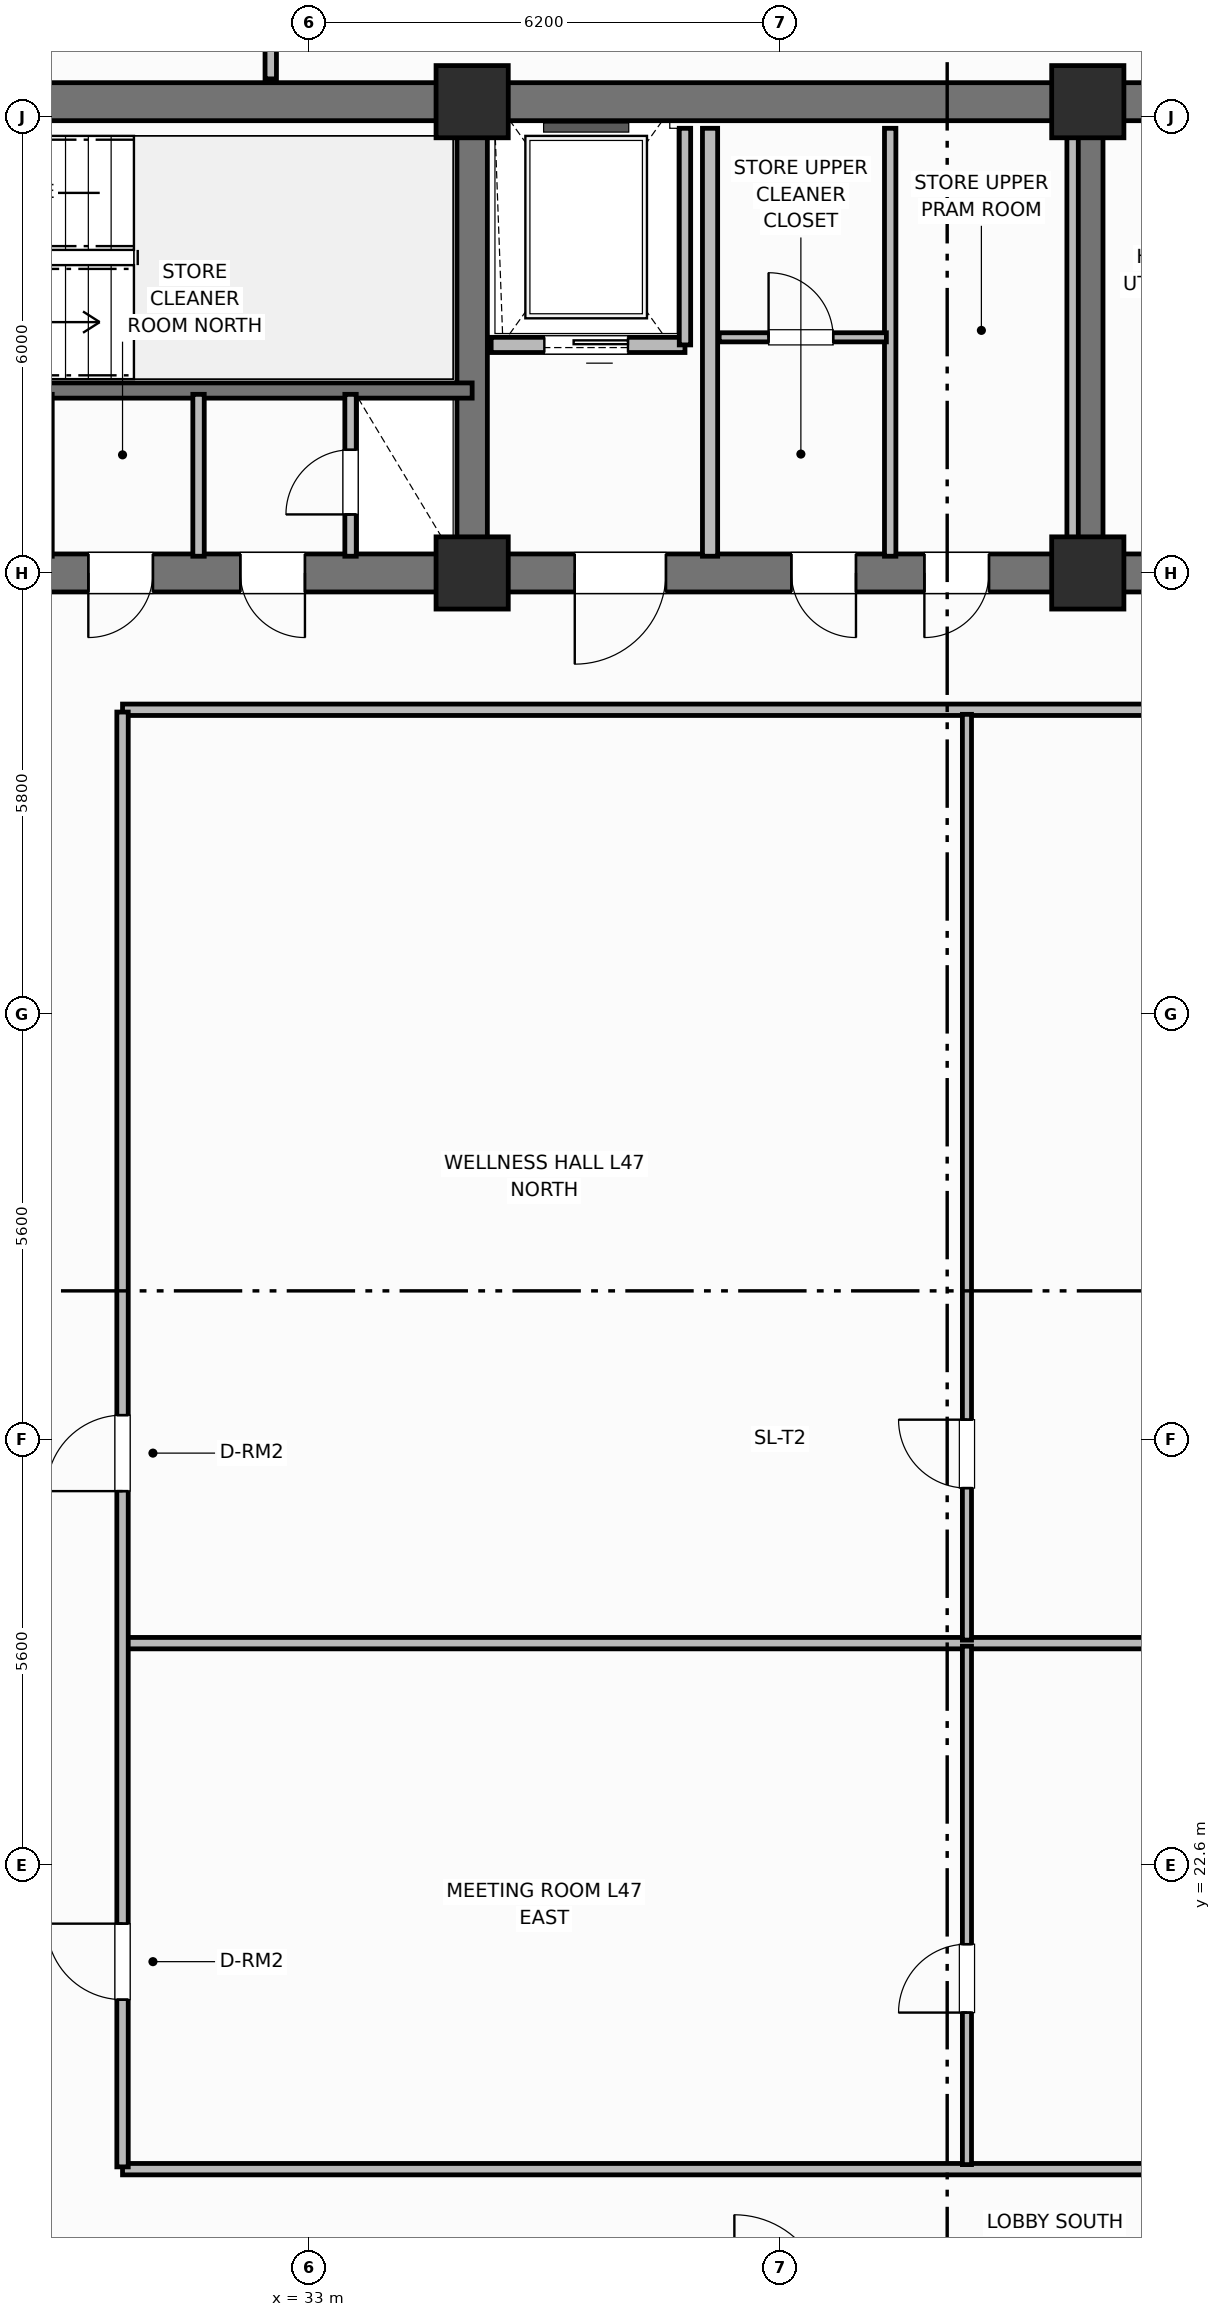
"""IFC4 building model, lengths in metres.
Left out: names, types, materials, properties, quantities, classifications, styles, units other than length and angle.
Written with IfcOpenShell. Run it as: python <this file> out.ifc"""

import sys

from ifc_helpers import new_model, si_unit, direction, frame, frame_2d, origin, origin_2d, place, context, subcontext, project, spatial, rectangle, extrude, element, fill, save


model = new_model("IFC4")
c1 = context("Model", 3, precision=1e-05, world=origin(), true_north=direction((0.0, 1.0)))
c2 = subcontext(c1, "Body", "Model", "MODEL_VIEW")
j1 = project(units=[si_unit("LENGTHUNIT", "METRE"), si_unit("PLANEANGLEUNIT", "RADIAN")], contexts=[c1])
p1 = place(None, origin())
s1 = spatial("IfcSite", under=j1, at=p1, CompositionType="ELEMENT")
p2 = place(p1, origin())
s2 = spatial("IfcBuilding", under=s1, at=p2, CompositionType="ELEMENT")
p3 = place(p2, frame((0.0, 0.0, 188.5)))
s3 = spatial("IfcBuildingStorey", under=s2, at=p3, CompositionType="ELEMENT", Elevation=188.5)
p4 = place(p3, frame((25.6, 45.8, 0.0), z_axis=(0.0, 0.0, 1.0), x_axis=(1.0, 0.0, 0.0)))
e1 = element("IfcWall", 1, at=p4, inside=s3, PredefinedType="SHEAR", context=c2, shape_type="SweptSolid", body=[
    extrude(rectangle(XDim=27.2, YDim=0.5, at=frame_2d((13.6, 0.0))), origin(), (0.0, 0.0, 1.0), 3.7),
])
p5 = place(p3, frame((52.8, 39.6, 0.0), z_axis=(0.0, 0.0, 1.0), x_axis=(-1.0, 0.0, 0.0)))
e2 = element("IfcWall", 2, at=p5, inside=s3, PredefinedType="SHEAR", context=c2, shape_type="SweptSolid", body=[
    extrude(rectangle(XDim=27.2, YDim=0.5, at=frame_2d((13.6, 0.0))), origin(), (0.0, 0.0, 1.0), 3.7),
])
p6 = place(p5, frame((24.3, 0.0, 0.0)))
e3 = element("IfcOpeningElement", 3, at=p6, cuts=e2, PredefinedType="OPENING", context=c2, shape_type="SweptSolid", body=[
    extrude(rectangle(XDim=1.1, YDim=2.15, at=frame_2d((0.55, 1.075))), frame((0.0, 0.26, 0.0), z_axis=(0.0, -1.0, 0.0), x_axis=(1.0, 0.0, 0.0)), (0.0, 0.0, 1.0), 0.52),
])
p7 = place(p5, frame((21.85, 0.0, 0.0)))
e4 = element("IfcOpeningElement", 4, at=p7, cuts=e2, PredefinedType="OPENING", context=c2, shape_type="SweptSolid", body=[
    extrude(rectangle(XDim=0.85, YDim=2.1, at=frame_2d((0.425, 1.05))), frame((0.0, 0.26, 0.0), z_axis=(0.0, -1.0, 0.0), x_axis=(1.0, 0.0, 0.0)), (0.0, 0.0, 1.0), 0.52),
])
p8 = place(p5, frame((19.85, 0.0, 0.0)))
e5 = element("IfcOpeningElement", 5, at=p8, cuts=e2, PredefinedType="OPENING", context=c2, shape_type="SweptSolid", body=[
    extrude(rectangle(XDim=0.85, YDim=2.1, at=frame_2d((0.425, 1.05))), frame((0.0, 0.26, 0.0), z_axis=(0.0, -1.0, 0.0), x_axis=(1.0, 0.0, 0.0)), (0.0, 0.0, 1.0), 0.52),
])
p9 = place(p5, frame((15.1, 0.0, 0.0)))
e6 = element("IfcOpeningElement", 6, at=p9, cuts=e2, PredefinedType="OPENING", context=c2, shape_type="SweptSolid", body=[
    extrude(rectangle(XDim=1.2, YDim=2.15, at=frame_2d((0.6, 1.075))), frame((0.0, 0.26, 0.0), z_axis=(0.0, -1.0, 0.0), x_axis=(1.0, 0.0, 0.0)), (0.0, 0.0, 1.0), 0.52),
])
p10 = place(p5, frame((12.6, 0.0, 0.0)))
e7 = element("IfcOpeningElement", 7, at=p10, cuts=e2, PredefinedType="OPENING", context=c2, shape_type="SweptSolid", body=[
    extrude(rectangle(XDim=0.85, YDim=2.1, at=frame_2d((0.425, 1.05))), frame((0.0, 0.26, 0.0), z_axis=(0.0, -1.0, 0.0), x_axis=(1.0, 0.0, 0.0)), (0.0, 0.0, 1.0), 0.52),
])
p11 = place(p5, frame((10.85, 0.0, 0.0)))
e8 = element("IfcOpeningElement", 8, at=p11, cuts=e2, PredefinedType="OPENING", context=c2, shape_type="SweptSolid", body=[
    extrude(rectangle(XDim=0.85, YDim=2.1, at=frame_2d((0.425, 1.05))), frame((0.0, 0.26, 0.0), z_axis=(0.0, -1.0, 0.0), x_axis=(1.0, 0.0, 0.0)), (0.0, 0.0, 1.0), 0.52),
])
p12 = place(p5, frame((7.35, 0.0, 0.0)))
e9 = element("IfcOpeningElement", 9, at=p12, cuts=e2, PredefinedType="OPENING", context=c2, shape_type="SweptSolid", body=[
    extrude(rectangle(XDim=0.85, YDim=2.1, at=frame_2d((0.425, 1.05))), frame((0.0, 0.26, 0.0), z_axis=(0.0, -1.0, 0.0), x_axis=(1.0, 0.0, 0.0)), (0.0, 0.0, 1.0), 0.52),
])
p13 = place(p5, frame((5.35, 0.0, 0.0)))
e10 = element("IfcOpeningElement", 10, at=p13, cuts=e2, PredefinedType="OPENING", context=c2, shape_type="SweptSolid", body=[
    extrude(rectangle(XDim=0.85, YDim=2.1, at=frame_2d((0.425, 1.05))), frame((0.0, 0.26, 0.0), z_axis=(0.0, -1.0, 0.0), x_axis=(1.0, 0.0, 0.0)), (0.0, 0.0, 1.0), 0.52),
])
p14 = place(p5, frame((2.0, 0.0, 0.0)))
e11 = element("IfcOpeningElement", 11, at=p14, cuts=e2, PredefinedType="OPENING", context=c2, shape_type="SweptSolid", body=[
    extrude(rectangle(XDim=0.85, YDim=2.1, at=frame_2d((0.425, 1.05))), frame((0.0, 0.26, 0.0), z_axis=(0.0, -1.0, 0.0), x_axis=(1.0, 0.0, 0.0)), (0.0, 0.0, 1.0), 0.52),
])
for number, where, z_axis, x_axis in (
    (12, (35.15, 39.85, 0.0), (0.0, 0.0, 1.0), (0.0, 1.0, 0.0)),
    (13, (43.25, 39.85, 0.0), (0.0, 0.0, 1.0), (0.0, 1.0, 0.0)),
):
    element("IfcWall", number, at=place(p3, frame(where, z_axis=z_axis, x_axis=x_axis)), inside=s3, PredefinedType="SHEAR", context=c2, shape_type="SweptSolid", body=[
        extrude(rectangle(XDim=5.7, YDim=0.4, at=frame_2d((2.85, 0.0))), origin(), (0.0, 0.0, 1.0), 3.7),
    ])
for number, where, z_axis, x_axis in (
    (14, (35.15, 39.6, 0.0), (0.0, 0.0, 1.0), (1.0, 0.0, 0.0)),
    (15, (35.15, 45.8, 0.0), (0.0, 0.0, 1.0), (1.0, 0.0, 0.0)),
    (16, (43.25, 39.6, 0.0), (0.0, 0.0, 1.0), (1.0, 0.0, 0.0)),
    (17, (43.25, 45.8, 0.0), (0.0, 0.0, 1.0), (1.0, 0.0, 0.0)),
):
    element("IfcColumn", number, at=place(p3, frame(where, z_axis=z_axis, x_axis=x_axis)), inside=s3, PredefinedType="COLUMN", context=c2, shape_type="SweptSolid", body=[
        extrude(rectangle(XDim=0.95, YDim=0.95, at=origin_2d()), origin(), (0.0, 0.0, 1.0), 3.7),
    ])
p15 = place(p3, frame((35.15, 42.0, 0.0), z_axis=(0.0, 0.0, 1.0), x_axis=(-1.0, 0.0, 0.0)))
e18 = element("IfcWall", 18, at=p15, inside=s3, PredefinedType="SHEAR", context=c2, shape_type="SweptSolid", body=[
    extrude(rectangle(XDim=9.55, YDim=0.2, at=frame_2d((4.775, 0.0))), origin(), (0.0, 0.0, 1.0), 3.7),
])
p16 = place(p15, frame((7.25, 0.0, 0.0)))
e19 = element("IfcOpeningElement", 19, at=p16, cuts=e18, PredefinedType="OPENING", context=c2, shape_type="SweptSolid", body=[
    extrude(rectangle(XDim=1.1, YDim=2.15, at=frame_2d((0.55, 1.075))), frame((0.0, 0.11, 0.0), z_axis=(0.0, -1.0, 0.0), x_axis=(1.0, 0.0, 0.0)), (0.0, 0.0, 1.0), 0.22),
])
p17 = place(p3, frame((33.55, 39.82, 0.0), z_axis=(0.0, 0.0, 1.0), x_axis=(0.0, 1.0, 0.0)))
e20 = element("IfcWall", 20, at=p17, inside=s3, PredefinedType="PARTITIONING", context=c2, shape_type="SweptSolid", body=[
    extrude(rectangle(XDim=2.13, YDim=0.15, at=frame_2d((1.065, 0.0))), origin(), (0.0, 0.0, 1.0), 2.55),
])
p18 = place(p17, frame((0.55, 0.0, 0.0)))
e21 = element("IfcOpeningElement", 21, at=p18, cuts=e20, PredefinedType="OPENING", context=c2, shape_type="SweptSolid", body=[
    extrude(rectangle(XDim=0.85, YDim=2.05, at=frame_2d((0.425, 1.025))), frame((0.0, 0.085, 0.0), z_axis=(0.0, -1.0, 0.0), x_axis=(1.0, 0.0, 0.0)), (0.0, 0.0, 1.0), 0.17),
])
for number, where, z_axis, x_axis in (
    (22, (29.55, 39.82, 0.0), (0.0, 0.0, 1.0), (0.0, 1.0, 0.0)),
    (23, (31.55, 39.82, 0.0), (0.0, 0.0, 1.0), (0.0, 1.0, 0.0)),
):
    element("IfcWall", number, at=place(p3, frame(where, z_axis=z_axis, x_axis=x_axis)), inside=s3, PredefinedType="PARTITIONING", context=c2, shape_type="SweptSolid", body=[
        extrude(rectangle(XDim=2.13, YDim=0.15, at=frame_2d((1.065, 0.0))), origin(), (0.0, 0.0, 1.0), 2.55),
    ])
p19 = place(p3, frame((37.95, 42.6, 0.0), z_axis=(0.0, 0.0, 1.0), x_axis=(-1.0, 0.0, 0.0)))
e24 = element("IfcWall", 24, at=p19, inside=s3, PredefinedType="PARTITIONING", context=c2, shape_type="SweptSolid", body=[
    extrude(rectangle(XDim=2.55, YDim=0.2, at=frame_2d((1.275, 0.0))), origin(), (0.0, 0.0, 1.0), 2.32),
])
p20 = place(p19, frame((0.75, 0.0, 0.0)))
e25 = element("IfcOpeningElement", 25, at=p20, cuts=e24, PredefinedType="OPENING", context=c2, shape_type="SweptSolid", body=[
    extrude(rectangle(XDim=1.1, YDim=2.15, at=frame_2d((0.55, 1.075))), frame((0.0, 0.11, 0.0), z_axis=(0.0, -1.0, 0.0), x_axis=(1.0, 0.0, 0.0)), (0.0, 0.0, 1.0), 0.22),
])
p21 = place(p3, frame((37.95, 42.6, 0.0), z_axis=(0.0, 0.0, 1.0), x_axis=(0.0, 1.0, 0.0)))
e26 = element("IfcWall", 26, at=p21, inside=s3, PredefinedType="PARTITIONING", context=c2, shape_type="SweptSolid", body=[
    extrude(rectangle(XDim=2.85, YDim=0.15, at=frame_2d((1.425, 0.0))), origin(), (0.0, 0.0, 1.0), 2.55),
])
p22 = place(p3, frame((38.28, 39.82, 0.0), z_axis=(0.0, 0.0, 1.0), x_axis=(0.0, 1.0, 0.0)))
e27 = element("IfcWall", 27, at=p22, inside=s3, PredefinedType="PARTITIONING", context=c2, shape_type="SweptSolid", body=[
    extrude(rectangle(XDim=5.63, YDim=0.2, at=frame_2d((2.815, 0.0))), origin(), (0.0, 0.0, 1.0), 2.55),
])
for number, where, z_axis, x_axis in (
    (28, (43.05, 39.82, 0.0), (0.0, 0.0, 1.0), (0.0, 1.0, 0.0)),
    (29, (40.65, 39.82, 0.0), (0.0, 0.0, 1.0), (0.0, 1.0, 0.0)),
):
    element("IfcWall", number, at=place(p3, frame(where, z_axis=z_axis, x_axis=x_axis)), inside=s3, PredefinedType="PARTITIONING", context=c2, shape_type="SweptSolid", body=[
        extrude(rectangle(XDim=5.63, YDim=0.15, at=frame_2d((2.815, 0.0))), origin(), (0.0, 0.0, 1.0), 2.55),
    ])
p23 = place(p3, frame((38.4, 42.7, 0.0), z_axis=(0.0, 0.0, 1.0), x_axis=(1.0, 0.0, 0.0)))
e30 = element("IfcWall", 30, at=p23, inside=s3, PredefinedType="PARTITIONING", context=c2, shape_type="SweptSolid", body=[
    extrude(rectangle(XDim=2.2, YDim=0.12, at=frame_2d((1.1, 0.0))), origin(), (0.0, 0.0, 1.0), 2.32),
])
p24 = place(p23, frame((0.65, 0.0, 0.0)))
e31 = element("IfcOpeningElement", 31, at=p24, cuts=e30, PredefinedType="OPENING", context=c2, shape_type="SweptSolid", body=[
    extrude(rectangle(XDim=0.85, YDim=2.1, at=frame_2d((0.425, 1.05))), frame((0.0, 0.07, 0.0), z_axis=(0.0, -1.0, 0.0), x_axis=(1.0, 0.0, 0.0)), (0.0, 0.0, 1.0), 0.14),
])
for number, where, z_axis, x_axis in (
    (32, (30.55, 18.6, 0.0), (0.0, 0.0, 1.0), (1.0, 0.0, 0.0)),
    (33, (30.55, 37.8, 0.0), (0.0, 0.0, 1.0), (1.0, 0.0, 0.0)),
):
    element("IfcWall", number, at=place(p3, frame(where, z_axis=z_axis, x_axis=x_axis)), inside=s3, PredefinedType="PARTITIONING", context=c2, shape_type="SweptSolid", body=[
        extrude(rectangle(XDim=22.3, YDim=0.15, at=frame_2d((11.15, 0.0))), origin(), (0.0, 0.0, 1.0), 2.55),
    ])
p25 = place(p3, frame((30.58, 25.521, 0.0), z_axis=(0.0, 0.0, 1.0), x_axis=(1.0, 0.0, 0.0)))
e34 = element("IfcWall", 34, at=p25, inside=s3, PredefinedType="PARTITIONING", context=c2, shape_type="SweptSolid", body=[
    extrude(rectangle(XDim=22.22, YDim=0.15, at=frame_2d((11.11, 0.0))), origin(), (0.0, 0.0, 1.0), 2.55),
])
p26 = place(p3, frame((41.66, 18.66, 0.0), z_axis=(0.0, 0.0, 1.0), x_axis=(0.0, 1.0, 0.0)))
e35 = element("IfcWall", 35, at=p26, inside=s3, PredefinedType="PARTITIONING", context=c2, shape_type="SweptSolid", body=[
    extrude(rectangle(XDim=6.821, YDim=0.12, at=frame_2d((3.41, 0.0))), origin(), (0.0, 0.0, 1.0), 2.55),
])
p27 = place(p26, frame((2.0, 0.0, 0.0)))
e36 = element("IfcOpeningElement", 36, at=p27, cuts=e35, PredefinedType="OPENING", context=c2, shape_type="SweptSolid", body=[
    extrude(rectangle(XDim=0.9, YDim=2.1, at=frame_2d((0.45, 1.05))), frame((0.0, 0.07, 0.0), z_axis=(0.0, -1.0, 0.0), x_axis=(1.0, 0.0, 0.0)), (0.0, 0.0, 1.0), 0.14),
])
p28 = place(p3, frame((41.66, 25.56, 0.0), z_axis=(0.0, 0.0, 1.0), x_axis=(0.0, 1.0, 0.0)))
e37 = element("IfcWall", 37, at=p28, inside=s3, PredefinedType="PARTITIONING", context=c2, shape_type="SweptSolid", body=[
    extrude(rectangle(XDim=12.18, YDim=0.12, at=frame_2d((6.09, 0.0))), origin(), (0.0, 0.0, 1.0), 2.55),
])
p29 = place(p28, frame((2.0, 0.0, 0.0)))
e38 = element("IfcOpeningElement", 38, at=p29, cuts=e37, PredefinedType="OPENING", context=c2, shape_type="SweptSolid", body=[
    extrude(rectangle(XDim=0.9, YDim=2.1, at=frame_2d((0.45, 1.05))), frame((0.0, 0.07, 0.0), z_axis=(0.0, -1.0, 0.0), x_axis=(1.0, 0.0, 0.0)), (0.0, 0.0, 1.0), 0.14),
])
p30 = place(p3, frame((30.55, 18.63, 0.0), z_axis=(0.0, 0.0, 1.0), x_axis=(0.0, 1.0, 0.0)))
e39 = element("IfcWall", 39, at=p30, inside=s3, PredefinedType="PARTITIONING", context=c2, shape_type="SweptSolid", body=[
    extrude(rectangle(XDim=19.14, YDim=0.15, at=frame_2d((9.57, 0.0))), origin(), (0.0, 0.0, 1.0), 2.55),
])
p31 = place(p30, frame((2.2, 0.0, 0.0)))
e40 = element("IfcOpeningElement", 40, at=p31, cuts=e39, PredefinedType="OPENING", context=c2, shape_type="SweptSolid", body=[
    extrude(rectangle(XDim=1.0, YDim=2.15, at=frame_2d((0.5, 1.075))), frame((0.0, 0.085, 0.0), z_axis=(0.0, -1.0, 0.0), x_axis=(1.0, 0.0, 0.0)), (0.0, 0.0, 1.0), 0.17),
])
p32 = place(p30, frame((8.89, 0.0, 0.0)))
e41 = element("IfcOpeningElement", 41, at=p32, cuts=e39, PredefinedType="OPENING", context=c2, shape_type="SweptSolid", body=[
    extrude(rectangle(XDim=1.0, YDim=2.15, at=frame_2d((0.5, 1.075))), frame((0.0, 0.085, 0.0), z_axis=(0.0, -1.0, 0.0), x_axis=(1.0, 0.0, 0.0)), (0.0, 0.0, 1.0), 0.17),
])
p33 = place(p3, frame((32.5, 46.1, 0.0), z_axis=(0.0, 0.0, 1.0), x_axis=(0.0, 1.0, 0.0)))
e42 = element("IfcWall", 42, at=p33, inside=s3, PredefinedType="PARTITIONING", context=c2, shape_type="SweptSolid", body=[
    extrude(rectangle(XDim=3.43, YDim=0.15, at=frame_2d((1.715, 0.0))), origin(), (0.0, 0.0, 1.0), 2.55),
])
p34 = place(p33, frame((0.85, 0.0, 0.0)))
e43 = element("IfcOpeningElement", 43, at=p34, cuts=e42, PredefinedType="OPENING", context=c2, shape_type="SweptSolid", body=[
    extrude(rectangle(XDim=0.9, YDim=2.1, at=frame_2d((0.45, 1.05))), frame((0.0, 0.085, 0.0), z_axis=(0.0, -1.0, 0.0), x_axis=(1.0, 0.0, 0.0)), (0.0, 0.0, 1.0), 0.17),
])
p35 = place(p18, origin())
e44 = element("IfcDoor", 44, at=p35, inside=s3, OperationType="SINGLE_SWING_LEFT", PredefinedType="TRAPDOOR", context=c2, shape_type="SweptSolid", body=[
    extrude(rectangle(XDim=0.85, YDim=2.05, at=frame_2d((0.425, 1.025))), frame((0.0, 0.025, 0.0), z_axis=(0.0, -1.0, 0.0), x_axis=(1.0, 0.0, 0.0)), (0.0, 0.0, 1.0), 0.05),
])
fill(e21, e44)
p36 = place(p20, origin())
e45 = element("IfcDoor", 45, at=p36, inside=s3, OperationType="SLIDING_TO_LEFT", PredefinedType="DOOR", context=c2, shape_type="SweptSolid", body=[
    extrude(rectangle(XDim=1.1, YDim=2.15, at=frame_2d((0.55, 1.075))), frame((0.0, 0.025, 0.0), z_axis=(0.0, -1.0, 0.0), x_axis=(1.0, 0.0, 0.0)), (0.0, 0.0, 1.0), 0.05),
])
fill(e25, e45)
p37 = place(p24, origin())
e46 = element("IfcDoor", 46, at=p37, inside=s3, OperationType="SINGLE_SWING_LEFT", PredefinedType="DOOR", context=c2, shape_type="SweptSolid", body=[
    extrude(rectangle(XDim=0.85, YDim=2.1, at=frame_2d((0.425, 1.05))), frame((0.0, 0.025, 0.0), z_axis=(0.0, -1.0, 0.0), x_axis=(1.0, 0.0, 0.0)), (0.0, 0.0, 1.0), 0.05),
])
fill(e31, e46)
p38 = place(p27, origin())
e47 = element("IfcDoor", 47, at=p38, inside=s3, OperationType="SINGLE_SWING_LEFT", PredefinedType="DOOR", context=c2, shape_type="SweptSolid", body=[
    extrude(rectangle(XDim=0.9, YDim=2.1, at=frame_2d((0.45, 1.05))), frame((0.0, 0.025, 0.0), z_axis=(0.0, -1.0, 0.0), x_axis=(1.0, 0.0, 0.0)), (0.0, 0.0, 1.0), 0.05),
])
fill(e36, e47)
p39 = place(p29, origin())
e48 = element("IfcDoor", 48, at=p39, inside=s3, OperationType="SINGLE_SWING_RIGHT", PredefinedType="DOOR", context=c2, shape_type="SweptSolid", body=[
    extrude(rectangle(XDim=0.9, YDim=2.1, at=frame_2d((0.45, 1.05))), frame((0.0, 0.025, 0.0), z_axis=(0.0, -1.0, 0.0), x_axis=(1.0, 0.0, 0.0)), (0.0, 0.0, 1.0), 0.05),
])
fill(e38, e48)
p40 = place(p31, origin())
e49 = element("IfcDoor", 49, at=p40, inside=s3, OperationType="SINGLE_SWING_RIGHT", PredefinedType="DOOR", context=c2, shape_type="SweptSolid", body=[
    extrude(rectangle(XDim=1.0, YDim=2.15, at=frame_2d((0.5, 1.075))), frame((0.0, 0.025, 0.0), z_axis=(0.0, -1.0, 0.0), x_axis=(1.0, 0.0, 0.0)), (0.0, 0.0, 1.0), 0.05),
])
fill(e40, e49)
p41 = place(p32, origin())
e50 = element("IfcDoor", 50, at=p41, inside=s3, OperationType="SINGLE_SWING_LEFT", PredefinedType="DOOR", context=c2, shape_type="SweptSolid", body=[
    extrude(rectangle(XDim=1.0, YDim=2.15, at=frame_2d((0.5, 1.075))), frame((0.0, 0.025, 0.0), z_axis=(0.0, -1.0, 0.0), x_axis=(1.0, 0.0, 0.0)), (0.0, 0.0, 1.0), 0.05),
])
fill(e41, e50)
p42 = place(p7, origin())
e51 = element("IfcDoor", 51, at=p42, inside=s3, OperationType="SINGLE_SWING_RIGHT", PredefinedType="DOOR", context=c2, shape_type="SweptSolid", body=[
    extrude(rectangle(XDim=0.85, YDim=2.1, at=frame_2d((0.425, 1.05))), frame((0.0, 0.025, 0.0), z_axis=(0.0, -1.0, 0.0), x_axis=(1.0, 0.0, 0.0)), (0.0, 0.0, 1.0), 0.05),
])
fill(e4, e51)
p43 = place(p8, origin())
e52 = element("IfcDoor", 52, at=p43, inside=s3, OperationType="SINGLE_SWING_LEFT", PredefinedType="DOOR", context=c2, shape_type="SweptSolid", body=[
    extrude(rectangle(XDim=0.85, YDim=2.1, at=frame_2d((0.425, 1.05))), frame((0.0, 0.025, 0.0), z_axis=(0.0, -1.0, 0.0), x_axis=(1.0, 0.0, 0.0)), (0.0, 0.0, 1.0), 0.05),
])
fill(e5, e52)
p44 = place(p9, origin())
e53 = element("IfcDoor", 53, at=p44, inside=s3, OperationType="SINGLE_SWING_RIGHT", PredefinedType="DOOR", context=c2, shape_type="SweptSolid", body=[
    extrude(rectangle(XDim=1.2, YDim=2.15, at=frame_2d((0.6, 1.075))), frame((0.0, 0.025, 0.0), z_axis=(0.0, -1.0, 0.0), x_axis=(1.0, 0.0, 0.0)), (0.0, 0.0, 1.0), 0.05),
])
fill(e6, e53)
p45 = place(p10, origin())
e54 = element("IfcDoor", 54, at=p45, inside=s3, OperationType="SINGLE_SWING_LEFT", PredefinedType="DOOR", context=c2, shape_type="SweptSolid", body=[
    extrude(rectangle(XDim=0.85, YDim=2.1, at=frame_2d((0.425, 1.05))), frame((0.0, 0.025, 0.0), z_axis=(0.0, -1.0, 0.0), x_axis=(1.0, 0.0, 0.0)), (0.0, 0.0, 1.0), 0.05),
])
fill(e7, e54)
p46 = place(p11, origin())
e55 = element("IfcDoor", 55, at=p46, inside=s3, OperationType="SINGLE_SWING_RIGHT", PredefinedType="DOOR", context=c2, shape_type="SweptSolid", body=[
    extrude(rectangle(XDim=0.85, YDim=2.1, at=frame_2d((0.425, 1.05))), frame((0.0, 0.025, 0.0), z_axis=(0.0, -1.0, 0.0), x_axis=(1.0, 0.0, 0.0)), (0.0, 0.0, 1.0), 0.05),
])
fill(e8, e55)
save(model, sys.argv[1])
